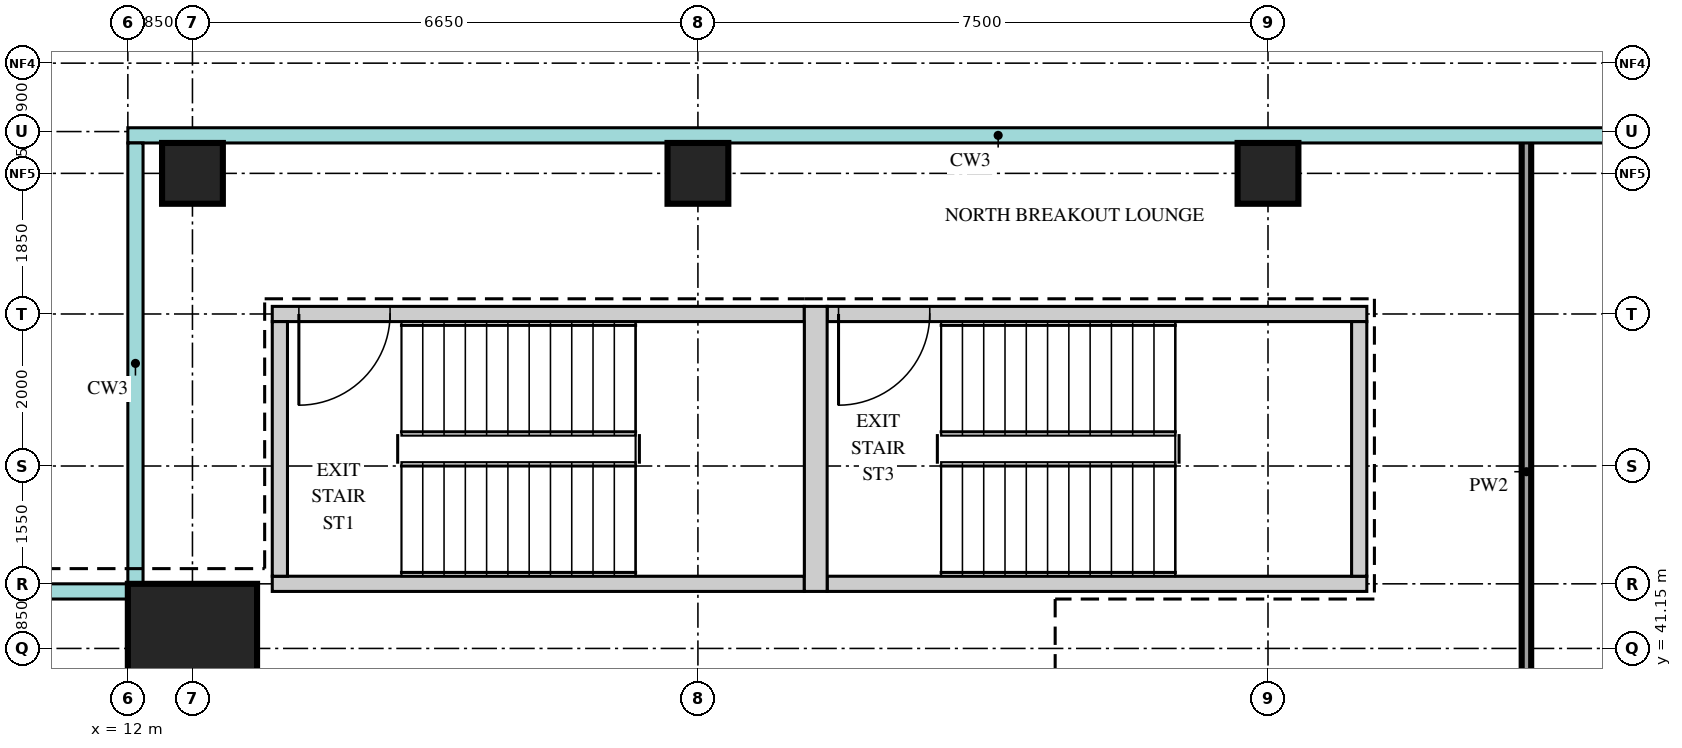
"""IFC4 building model, lengths in metres.
Left out: names, types, materials, properties, quantities, classifications, styles, units other than length and angle.
Written with IfcOpenShell. Run it as: python <this file> out.ifc"""

import sys

from ifc_helpers import new_model, si_unit, direction, frame, frame_2d, origin, origin_2d, place, context, subcontext, project, spatial, rectangle, extrude, source, transform, mapped, element, fill, save


model = new_model("IFC4")
c1 = context("Model", 3, precision=1e-05, world=origin(), true_north=direction((0.0, 1.0)))
c2 = subcontext(c1, "Body", "Model", "MODEL_VIEW")
j1 = project(units=[si_unit("LENGTHUNIT", "METRE"), si_unit("PLANEANGLEUNIT", "RADIAN")], contexts=[c1])
p1 = place(None, origin())
s1 = spatial("IfcSite", under=j1, at=p1, CompositionType="ELEMENT")
p2 = place(p1, origin())
s2 = spatial("IfcBuilding", under=s1, at=p2, CompositionType="ELEMENT")
p3 = place(p2, frame((0.0, 0.0, 326.2)))
s3 = spatial("IfcBuildingStorey", under=s2, at=p3, CompositionType="ELEMENT", Elevation=326.2)
m1 = source(origin(), c2, "Body", "SweptSolid", [
    extrude(rectangle(XDim=7.0, YDim=0.2, at=frame_2d((3.5, 0.0))), origin(), (0.0, 0.0, 1.0), 3.75),
])
p4 = place(p3, frame((13.9, 45.55, 0.0), z_axis=(0.0, 0.0, 1.0), x_axis=(1.0, 0.0, 0.0)))
e1 = element("IfcWall", 1, at=p4, inside=s3, PredefinedType="SHEAR", context=c2, shape_type="MappedRepresentation", body=[
    mapped(m1, transform((0.0, 0.0, 0.0))),
])
m2 = source(origin(), c2, "Body", "SweptSolid", [
    extrude(rectangle(XDim=1.2, YDim=2.1, at=frame_2d((0.6, 1.05))), frame((0.0, 0.11, 0.0), z_axis=(0.0, -1.0, 0.0), x_axis=(1.0, 0.0, 0.0)), (0.0, 0.0, 1.0), 0.22),
])
p5 = place(p4, frame((0.35, 0.0, 0.0)))
e2 = element("IfcOpeningElement", 2, at=p5, cuts=e1, PredefinedType="OPENING", context=c2, shape_type="MappedRepresentation", body=[
    mapped(m2, transform((0.0, 0.0, 0.0))),
])
p6 = place(p3, frame((13.9, 42.0, 0.0), z_axis=(0.0, 0.0, 1.0), x_axis=(1.0, 0.0, 0.0)))
e3 = element("IfcWall", 3, at=p6, inside=s3, PredefinedType="SHEAR", context=c2, shape_type="MappedRepresentation", body=[
    mapped(m1, transform((0.0, 0.0, 0.0))),
])
m3 = source(origin(), c2, "Body", "SweptSolid", [
    extrude(rectangle(XDim=7.1, YDim=0.2, at=frame_2d((3.55, 0.0))), origin(), (0.0, 0.0, 1.0), 3.75),
])
p7 = place(p3, frame((21.2, 45.55, 0.0), z_axis=(0.0, 0.0, 1.0), x_axis=(1.0, 0.0, 0.0)))
e4 = element("IfcWall", 4, at=p7, inside=s3, PredefinedType="SHEAR", context=c2, shape_type="MappedRepresentation", body=[
    mapped(m3, transform((0.0, 0.0, 0.0))),
])
p8 = place(p7, frame((0.15, 0.0, 0.0)))
e5 = element("IfcOpeningElement", 5, at=p8, cuts=e4, PredefinedType="OPENING", context=c2, shape_type="MappedRepresentation", body=[
    mapped(m2, transform((0.0, 0.0, 0.0))),
])
p9 = place(p3, frame((21.2, 42.0, 0.0), z_axis=(0.0, 0.0, 1.0), x_axis=(1.0, 0.0, 0.0)))
e6 = element("IfcWall", 6, at=p9, inside=s3, PredefinedType="SHEAR", context=c2, shape_type="MappedRepresentation", body=[
    mapped(m3, transform((0.0, 0.0, 0.0))),
])
m4 = source(origin(), c2, "Body", "SweptSolid", [
    extrude(rectangle(XDim=3.75, YDim=0.3, at=frame_2d((1.875, 0.0))), origin(), (0.0, 0.0, 1.0), 3.75),
])
p10 = place(p3, frame((21.05, 41.9, 0.0), z_axis=(0.0, 0.0, 1.0), x_axis=(0.0, 1.0, 0.0)))
e7 = element("IfcWall", 7, at=p10, inside=s3, PredefinedType="SHEAR", context=c2, shape_type="MappedRepresentation", body=[
    mapped(m4, transform((0.0, 0.0, 0.0))),
])
m5 = source(origin(), c2, "Body", "SweptSolid", [
    extrude(rectangle(XDim=3.35, YDim=0.2, at=frame_2d((1.675, 0.0))), origin(), (0.0, 0.0, 1.0), 3.75),
])
for number, where, z_axis, x_axis in (
    (8, (14.0, 42.1, 0.0), (0.0, 0.0, 1.0), (0.0, 1.0, 0.0)),
    (9, (28.2, 42.1, 0.0), (0.0, 0.0, 1.0), (0.0, 1.0, 0.0)),
):
    element("IfcWall", number, at=place(p3, frame(where, z_axis=z_axis, x_axis=x_axis)), inside=s3, PredefinedType="SHEAR", context=c2, shape_type="MappedRepresentation", body=[
        mapped(m5, transform((0.0, 0.0, 0.0))),
    ])
m6 = source(origin(), c2, "Body", "SweptSolid", [
    extrude(rectangle(XDim=1.7, YDim=1.7, at=origin_2d()), origin(), (0.0, 0.0, 1.0), 3.75),
])
p11 = place(p3, frame((12.85, 41.15, 0.0), z_axis=(0.0, 0.0, 1.0), x_axis=(1.0, 0.0, 0.0)))
e10 = element("IfcColumn", 10, at=p11, inside=s3, PredefinedType="COLUMN", context=c2, shape_type="MappedRepresentation", body=[
    mapped(m6, transform((0.0, 0.0, 0.0))),
])
m7 = source(origin(), c2, "Body", "SweptSolid", [
    extrude(rectangle(XDim=0.8, YDim=0.8, at=origin_2d()), origin(), (0.0, 0.0, 1.0), 3.75),
])
for number, where, z_axis, x_axis in (
    (11, (12.85, 47.4, 0.0), (0.0, 0.0, 1.0), (1.0, 0.0, 0.0)),
    (12, (19.5, 47.4, 0.0), (0.0, 0.0, 1.0), (1.0, 0.0, 0.0)),
    (13, (27.0, 47.4, 0.0), (0.0, 0.0, 1.0), (1.0, 0.0, 0.0)),
):
    element("IfcColumn", number, at=place(p3, frame(where, z_axis=z_axis, x_axis=x_axis)), inside=s3, PredefinedType="COLUMN", context=c2, shape_type="MappedRepresentation", body=[
        mapped(m7, transform((0.0, 0.0, 0.0))),
    ])
m8 = source(origin(), c2, "Body", "SweptSolid", [
    extrude(rectangle(XDim=8.75, YDim=0.125, at=frame_2d((4.375, 0.0))), origin(), (0.0, 0.0, 1.0), 3.8),
])
p12 = place(p3, frame((30.4, 39.1, 0.0), z_axis=(0.0, 0.0, 1.0), x_axis=(0.0, 1.0, 0.0)))
e14 = element("IfcWall", 14, at=p12, inside=s3, PredefinedType="PARTITIONING", context=c2, shape_type="MappedRepresentation", body=[
    mapped(m8, transform((0.0, 0.0, 0.0))),
])
m9 = source(origin(), c2, "Body", "SweptSolid", [
    extrude(rectangle(XDim=1.2, YDim=2.1, at=frame_2d((0.6, 1.05))), frame((0.0, 0.025, 0.0), z_axis=(0.0, -1.0, 0.0), x_axis=(1.0, 0.0, 0.0)), (0.0, 0.0, 1.0), 0.05),
])
p13 = place(p5, origin())
e15 = element("IfcDoor", 15, at=p13, inside=s3, OperationType="SINGLE_SWING_LEFT", PredefinedType="DOOR", context=c2, shape_type="MappedRepresentation", body=[
    mapped(m9, transform((0.0, 0.0, 0.0))),
])
fill(e2, e15)
p14 = place(p8, origin())
e16 = element("IfcDoor", 16, at=p14, inside=s3, OperationType="SINGLE_SWING_LEFT", PredefinedType="DOOR", context=c2, shape_type="MappedRepresentation", body=[
    mapped(m9, transform((0.0, 0.0, 0.0))),
])
fill(e5, e16)
save(model, sys.argv[1])
